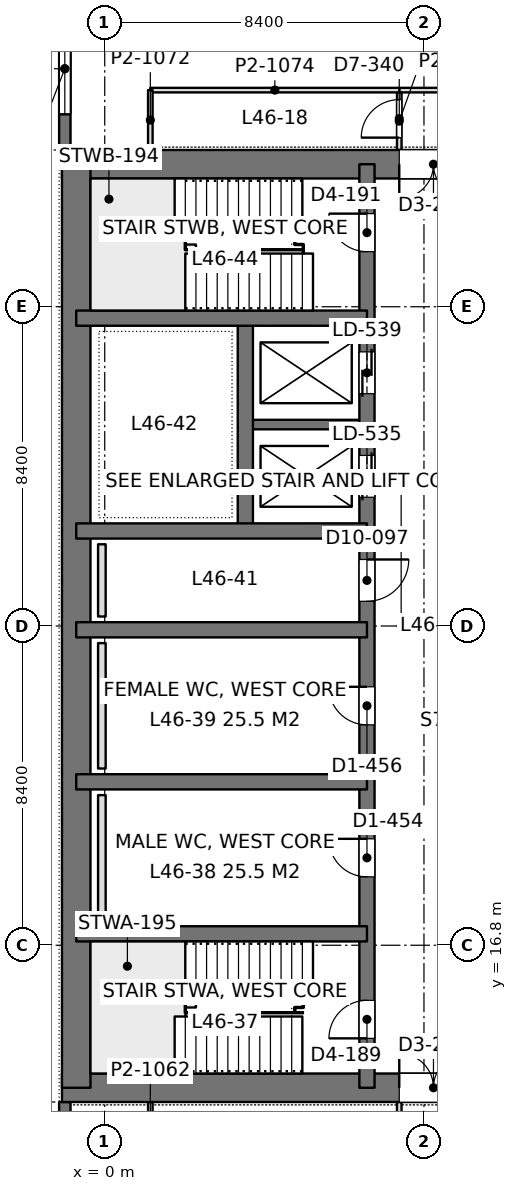
"""IFC4 building model, lengths in metres.
Left out: names, types, materials, properties, quantities, classifications, styles, units other than length and angle.
Written with IfcOpenShell. Run it as: python <this file> out.ifc"""

import sys

from ifc_helpers import new_model, si_unit, direction, frame, frame_2d, origin, place, context, subcontext, project, spatial, rectangle, extrude, element, fill, save


model = new_model("IFC4")
c1 = context("Model", 3, precision=1e-05, world=origin(), true_north=direction((0.0, 1.0)))
c2 = subcontext(c1, "Body", "Model", "MODEL_VIEW")
j1 = project(units=[si_unit("LENGTHUNIT", "METRE"), si_unit("PLANEANGLEUNIT", "RADIAN")], contexts=[c1])
p1 = place(None, origin())
s1 = spatial("IfcSite", under=j1, at=p1, CompositionType="ELEMENT")
p2 = place(p1, origin())
s2 = spatial("IfcBuilding", under=s1, at=p2, CompositionType="ELEMENT")
p3 = place(p2, frame((0.0, 0.0, 202.8)))
s3 = spatial("IfcBuildingStorey", under=s2, at=p3, CompositionType="ELEMENT", Elevation=202.8)
p4 = place(p3, frame((-1.125, 13.05, 0.0), z_axis=(0.0, 0.0, 1.0), x_axis=(1.0, 0.0, 0.0)))
e1 = element("IfcWall", 1, at=p4, inside=s3, PredefinedType="SHEAR", context=c2, shape_type="SweptSolid", body=[
    extrude(rectangle(XDim=17.85, YDim=0.75, at=frame_2d((8.925, 0.0))), origin(), (0.0, 0.0, 1.0), 4.2),
])
p5 = place(p4, frame((8.875, 0.0, 0.0)))
e2 = element("IfcOpeningElement", 2, at=p5, cuts=e1, PredefinedType="OPENING", context=c2, shape_type="SweptSolid", body=[
    extrude(rectangle(XDim=1.8, YDim=2.4, at=frame_2d((0.9, 1.2))), frame((0.0, 0.385, 0.0), z_axis=(0.0, -1.0, 0.0), x_axis=(1.0, 0.0, 0.0)), (0.0, 0.0, 1.0), 0.77),
])
p6 = place(p3, frame((-1.125, 37.35, 0.0), z_axis=(0.0, 0.0, 1.0), x_axis=(1.0, 0.0, 0.0)))
e3 = element("IfcWall", 3, at=p6, inside=s3, PredefinedType="SHEAR", context=c2, shape_type="SweptSolid", body=[
    extrude(rectangle(XDim=17.85, YDim=0.75, at=frame_2d((8.925, 0.0))), origin(), (0.0, 0.0, 1.0), 4.2),
])
p7 = place(p6, frame((8.875, 0.0, 0.0)))
e4 = element("IfcOpeningElement", 4, at=p7, cuts=e3, PredefinedType="OPENING", context=c2, shape_type="SweptSolid", body=[
    extrude(rectangle(XDim=1.8, YDim=2.4, at=frame_2d((0.9, 1.2))), frame((0.0, 0.385, 0.0), z_axis=(0.0, -1.0, 0.0), x_axis=(1.0, 0.0, 0.0)), (0.0, 0.0, 1.0), 0.77),
])
p8 = place(p3, frame((-0.75, 13.05, 0.0), z_axis=(0.0, 0.0, 1.0), x_axis=(0.0, 1.0, 0.0)))
e5 = element("IfcWall", 5, at=p8, inside=s3, PredefinedType="SHEAR", context=c2, shape_type="SweptSolid", body=[
    extrude(rectangle(XDim=24.3, YDim=0.75, at=frame_2d((12.15, 0.0))), origin(), (0.0, 0.0, 1.0), 4.2),
])
p9 = place(p3, frame((6.9, 13.05, 0.0), z_axis=(0.0, 0.0, 1.0), x_axis=(0.0, 1.0, 0.0)))
e6 = element("IfcWall", 6, at=p9, inside=s3, PredefinedType="SHEAR", context=c2, shape_type="SweptSolid", body=[
    extrude(rectangle(XDim=24.3, YDim=0.4, at=frame_2d((12.15, 0.0))), origin(), (0.0, 0.0, 1.0), 4.2),
])
p10 = place(p9, frame((1.3, 0.0, 0.0)))
e7 = element("IfcOpeningElement", 7, at=p10, cuts=e6, PredefinedType="OPENING", context=c2, shape_type="SweptSolid", body=[
    extrude(rectangle(XDim=1.0, YDim=2.2, at=frame_2d((0.5, 1.1))), frame((0.0, 0.21, 0.0), z_axis=(0.0, -1.0, 0.0), x_axis=(1.0, 0.0, 0.0)), (0.0, 0.0, 1.0), 0.42),
])
p11 = place(p9, frame((22.0, 0.0, 0.0)))
e8 = element("IfcOpeningElement", 8, at=p11, cuts=e6, PredefinedType="OPENING", context=c2, shape_type="SweptSolid", body=[
    extrude(rectangle(XDim=1.0, YDim=2.2, at=frame_2d((0.5, 1.1))), frame((0.0, 0.21, 0.0), z_axis=(0.0, -1.0, 0.0), x_axis=(1.0, 0.0, 0.0)), (0.0, 0.0, 1.0), 0.42),
])
p12 = place(p9, frame((5.55, 0.0, 0.0)))
e9 = element("IfcOpeningElement", 9, at=p12, cuts=e6, PredefinedType="OPENING", context=c2, shape_type="SweptSolid", body=[
    extrude(rectangle(XDim=1.0, YDim=2.2, at=frame_2d((0.5, 1.1))), frame((0.0, 0.21, 0.0), z_axis=(0.0, -1.0, 0.0), x_axis=(1.0, 0.0, 0.0)), (0.0, 0.0, 1.0), 0.42),
])
p13 = place(p9, frame((9.55, 0.0, 0.0)))
e10 = element("IfcOpeningElement", 10, at=p13, cuts=e6, PredefinedType="OPENING", context=c2, shape_type="SweptSolid", body=[
    extrude(rectangle(XDim=1.0, YDim=2.2, at=frame_2d((0.5, 1.1))), frame((0.0, 0.21, 0.0), z_axis=(0.0, -1.0, 0.0), x_axis=(1.0, 0.0, 0.0)), (0.0, 0.0, 1.0), 0.42),
])
p14 = place(p9, frame((12.8, 0.0, 0.0)))
e11 = element("IfcOpeningElement", 11, at=p14, cuts=e6, PredefinedType="OPENING", context=c2, shape_type="SweptSolid", body=[
    extrude(rectangle(XDim=1.1, YDim=2.2, at=frame_2d((0.55, 1.1))), frame((0.0, 0.21, 0.0), z_axis=(0.0, -1.0, 0.0), x_axis=(1.0, 0.0, 0.0)), (0.0, 0.0, 1.0), 0.42),
])
p15 = place(p9, frame((15.538, 0.0, 0.0)))
e12 = element("IfcOpeningElement", 12, at=p15, cuts=e6, PredefinedType="OPENING", context=c2, shape_type="SweptSolid", body=[
    extrude(rectangle(XDim=1.1, YDim=2.2, at=frame_2d((0.55, 1.1))), frame((0.0, 0.21, 0.0), z_axis=(0.0, -1.0, 0.0), x_axis=(1.0, 0.0, 0.0)), (0.0, 0.0, 1.0), 0.42),
])
p16 = place(p9, frame((18.262, 0.0, 0.0)))
e13 = element("IfcOpeningElement", 13, at=p16, cuts=e6, PredefinedType="OPENING", context=c2, shape_type="SweptSolid", body=[
    extrude(rectangle(XDim=1.1, YDim=2.2, at=frame_2d((0.55, 1.1))), frame((0.0, 0.21, 0.0), z_axis=(0.0, -1.0, 0.0), x_axis=(1.0, 0.0, 0.0)), (0.0, 0.0, 1.0), 0.42),
])
for number, where, z_axis, x_axis in (
    (14, (-0.75, 17.1, 0.0), (0.0, 0.0, 1.0), (1.0, 0.0, 0.0)),
    (15, (-0.75, 21.1, 0.0), (0.0, 0.0, 1.0), (1.0, 0.0, 0.0)),
    (16, (-0.75, 25.1, 0.0), (0.0, 0.0, 1.0), (1.0, 0.0, 0.0)),
    (17, (-0.75, 27.7, 0.0), (0.0, 0.0, 1.0), (1.0, 0.0, 0.0)),
    (18, (-0.75, 33.3, 0.0), (0.0, 0.0, 1.0), (1.0, 0.0, 0.0)),
):
    element("IfcWall", number, at=place(p3, frame(where, z_axis=z_axis, x_axis=x_axis)), inside=s3, PredefinedType="SHEAR", context=c2, shape_type="SweptSolid", body=[
        extrude(rectangle(XDim=7.65, YDim=0.4, at=frame_2d((3.825, 0.0))), origin(), (0.0, 0.0, 1.0), 4.2),
    ])
p17 = place(p3, frame((3.7, 27.7, 0.0), z_axis=(0.0, 0.0, 1.0), x_axis=(0.0, 1.0, 0.0)))
e19 = element("IfcWall", 19, at=p17, inside=s3, PredefinedType="SHEAR", context=c2, shape_type="SweptSolid", body=[
    extrude(rectangle(XDim=5.6, YDim=0.4, at=frame_2d((2.8, 0.0))), origin(), (0.0, 0.0, 1.0), 4.2),
])
p18 = place(p3, frame((3.7, 30.5, 0.0), z_axis=(0.0, 0.0, 1.0), x_axis=(1.0, 0.0, 0.0)))
e20 = element("IfcWall", 20, at=p18, inside=s3, PredefinedType="SHEAR", context=c2, shape_type="SweptSolid", body=[
    extrude(rectangle(XDim=3.2, YDim=0.25, at=frame_2d((1.6, 0.0))), origin(), (0.0, 0.0, 1.0), 4.2),
])
p19 = place(p3, frame((-1.05, 8.4, 0.0), z_axis=(0.0, 0.0, 1.0), x_axis=(0.0, 1.0, 0.0)))
e21 = element("IfcWall", 21, at=p19, inside=s3, PredefinedType="SOLIDWALL", context=c2, shape_type="SweptSolid", body=[
    extrude(rectangle(XDim=4.275, YDim=0.3, at=frame_2d((2.138, 0.0))), origin(), (0.0, 0.0, 1.0), 4.05),
])
p20 = place(p19, frame((0.938, 0.0, 0.9)))
e22 = element("IfcOpeningElement", 22, at=p20, cuts=e21, PredefinedType="OPENING", context=c2, shape_type="SweptSolid", body=[
    extrude(rectangle(XDim=2.4, YDim=1.9, at=frame_2d((1.2, 0.95))), frame((0.0, 0.16, 0.0), z_axis=(0.0, -1.0, 0.0), x_axis=(1.0, 0.0, 0.0)), (0.0, 0.0, 1.0), 0.32),
])
p21 = place(p3, frame((-1.05, 37.725, 0.0), z_axis=(0.0, 0.0, 1.0), x_axis=(0.0, 1.0, 0.0)))
e23 = element("IfcWall", 23, at=p21, inside=s3, PredefinedType="SOLIDWALL", context=c2, shape_type="SweptSolid", body=[
    extrude(rectangle(XDim=4.275, YDim=0.3, at=frame_2d((2.137, 0.0))), origin(), (0.0, 0.0, 1.0), 4.05),
])
p22 = place(p21, frame((0.938, 0.0, 0.9)))
e24 = element("IfcOpeningElement", 24, at=p22, cuts=e23, PredefinedType="OPENING", context=c2, shape_type="SweptSolid", body=[
    extrude(rectangle(XDim=2.4, YDim=1.9, at=frame_2d((1.2, 0.95))), frame((0.0, 0.16, 0.0), z_axis=(0.0, -1.0, 0.0), x_axis=(1.0, 0.0, 0.0)), (0.0, 0.0, 1.0), 0.32),
])
p23 = place(p3, frame((7.75, 11.158, 0.0), z_axis=(0.0, 0.0, 1.0), x_axis=(0.0, 1.0, 0.0)))
e25 = element("IfcWall", 25, at=p23, inside=s3, PredefinedType="PARTITIONING", context=c2, shape_type="SweptSolid", body=[
    extrude(rectangle(XDim=1.518, YDim=0.12, at=frame_2d((0.759, 0.0))), origin(), (0.0, 0.0, 1.0), 4.05),
])
p24 = place(p23, frame((0.192, 0.0, 0.0)))
e26 = element("IfcOpeningElement", 26, at=p24, cuts=e25, PredefinedType="OPENING", context=c2, shape_type="SweptSolid", body=[
    extrude(rectangle(XDim=1.0, YDim=2.4, at=frame_2d((0.5, 1.2))), frame((0.0, 0.07, 0.0), z_axis=(0.0, -1.0, 0.0), x_axis=(1.0, 0.0, 0.0)), (0.0, 0.0, 1.0), 0.14),
])
p25 = place(p3, frame((1.2, 11.1, 0.0), z_axis=(0.0, 0.0, 1.0), x_axis=(0.0, 1.0, 0.0)))
e27 = element("IfcWall", 27, at=p25, inside=s3, PredefinedType="PARTITIONING", context=c2, shape_type="SweptSolid", body=[
    extrude(rectangle(XDim=1.576, YDim=0.12, at=frame_2d((0.788, 0.0))), origin(), (0.0, 0.0, 1.0), 4.05),
])
p26 = place(p3, frame((7.748, 39.3, 0.0), z_axis=(0.0, 0.0, 1.0), x_axis=(1.0, 0.0, 0.0)))
e28 = element("IfcWall", 28, at=p26, inside=s3, PredefinedType="PARTITIONING", context=c2, shape_type="SweptSolid", body=[
    extrude(rectangle(XDim=34.904, YDim=0.12, at=frame_2d((17.452, 0.0))), origin(), (0.0, 0.0, 1.0), 3.55),
])
p27 = place(p26, frame((2.119, 0.0, 0.0)))
e29 = element("IfcOpeningElement", 29, at=p27, cuts=e28, PredefinedType="OPENING", context=c2, shape_type="SweptSolid", body=[
    extrude(rectangle(XDim=1.8, YDim=2.2, at=frame_2d((0.9, 1.1))), frame((0.0, 0.07, 0.0), z_axis=(0.0, -1.0, 0.0), x_axis=(1.0, 0.0, 0.0)), (0.0, 0.0, 1.0), 0.14),
])
p28 = place(p26, frame((5.135, 0.0, 0.0)))
e30 = element("IfcOpeningElement", 30, at=p28, cuts=e28, PredefinedType="OPENING", context=c2, shape_type="SweptSolid", body=[
    extrude(rectangle(XDim=1.8, YDim=2.2, at=frame_2d((0.9, 1.1))), frame((0.0, 0.07, 0.0), z_axis=(0.0, -1.0, 0.0), x_axis=(1.0, 0.0, 0.0)), (0.0, 0.0, 1.0), 0.14),
])
p29 = place(p26, frame((13.752, 0.0, 0.0)))
e31 = element("IfcOpeningElement", 31, at=p29, cuts=e28, PredefinedType="OPENING", context=c2, shape_type="SweptSolid", body=[
    extrude(rectangle(XDim=1.8, YDim=2.2, at=frame_2d((0.9, 1.1))), frame((0.0, 0.07, 0.0), z_axis=(0.0, -1.0, 0.0), x_axis=(1.0, 0.0, 0.0)), (0.0, 0.0, 1.0), 0.14),
])
p30 = place(p26, frame((19.352, 0.0, 0.0)))
e32 = element("IfcOpeningElement", 32, at=p30, cuts=e28, PredefinedType="OPENING", context=c2, shape_type="SweptSolid", body=[
    extrude(rectangle(XDim=1.8, YDim=2.2, at=frame_2d((0.9, 1.1))), frame((0.0, 0.07, 0.0), z_axis=(0.0, -1.0, 0.0), x_axis=(1.0, 0.0, 0.0)), (0.0, 0.0, 1.0), 0.14),
])
p31 = place(p26, frame((27.969, 0.0, 0.0)))
e33 = element("IfcOpeningElement", 33, at=p31, cuts=e28, PredefinedType="OPENING", context=c2, shape_type="SweptSolid", body=[
    extrude(rectangle(XDim=1.8, YDim=2.2, at=frame_2d((0.9, 1.1))), frame((0.0, 0.07, 0.0), z_axis=(0.0, -1.0, 0.0), x_axis=(1.0, 0.0, 0.0)), (0.0, 0.0, 1.0), 0.14),
])
p32 = place(p26, frame((30.985, 0.0, 0.0)))
e34 = element("IfcOpeningElement", 34, at=p32, cuts=e28, PredefinedType="OPENING", context=c2, shape_type="SweptSolid", body=[
    extrude(rectangle(XDim=1.8, YDim=2.2, at=frame_2d((0.9, 1.1))), frame((0.0, 0.07, 0.0), z_axis=(0.0, -1.0, 0.0), x_axis=(1.0, 0.0, 0.0)), (0.0, 0.0, 1.0), 0.14),
])
p33 = place(p3, frame((7.75, 37.724, 0.0), z_axis=(0.0, 0.0, 1.0), x_axis=(0.0, 1.0, 0.0)))
e35 = element("IfcWall", 35, at=p33, inside=s3, PredefinedType="PARTITIONING", context=c2, shape_type="SweptSolid", body=[
    extrude(rectangle(XDim=1.518, YDim=0.12, at=frame_2d((0.759, 0.0))), origin(), (0.0, 0.0, 1.0), 4.05),
])
p34 = place(p33, frame((0.326, 0.0, 0.0)))
e36 = element("IfcOpeningElement", 36, at=p34, cuts=e35, PredefinedType="OPENING", context=c2, shape_type="SweptSolid", body=[
    extrude(rectangle(XDim=1.0, YDim=2.4, at=frame_2d((0.5, 1.2))), frame((0.0, 0.07, 0.0), z_axis=(0.0, -1.0, 0.0), x_axis=(1.0, 0.0, 0.0)), (0.0, 0.0, 1.0), 0.14),
])
p35 = place(p3, frame((1.2, 39.3, 0.0), z_axis=(0.0, 0.0, 1.0), x_axis=(1.0, 0.0, 0.0)))
e37 = element("IfcWall", 37, at=p35, inside=s3, PredefinedType="PARTITIONING", context=c2, shape_type="SweptSolid", body=[
    extrude(rectangle(XDim=6.552, YDim=0.12, at=frame_2d((3.276, 0.0))), origin(), (0.0, 0.0, 1.0), 3.69),
])
p36 = place(p3, frame((1.2, 37.724, 0.0), z_axis=(0.0, 0.0, 1.0), x_axis=(0.0, 1.0, 0.0)))
e38 = element("IfcWall", 38, at=p36, inside=s3, PredefinedType="PARTITIONING", context=c2, shape_type="SweptSolid", body=[
    extrude(rectangle(XDim=1.576, YDim=0.12, at=frame_2d((0.788, 0.0))), origin(), (0.0, 0.0, 1.0), 4.05),
])
for number, where, z_axis, x_axis in (
    (39, (-0.075, 17.45, 0.0), (0.0, 0.0, 1.0), (0.0, 1.0, 0.0)),
    (40, (-0.075, 21.45, 0.0), (0.0, 0.0, 1.0), (0.0, 1.0, 0.0)),
):
    element("IfcWall", number, at=place(p3, frame(where, z_axis=z_axis, x_axis=x_axis)), inside=s3, PredefinedType="PLUMBINGWALL", context=c2, shape_type="SweptSolid", body=[
        extrude(rectangle(XDim=3.3, YDim=0.2, at=frame_2d((1.65, 0.0))), origin(), (0.0, 0.0, 1.0), 1.2),
    ])
p37 = place(p3, frame((-0.075, 25.45, 0.0), z_axis=(0.0, 0.0, 1.0), x_axis=(0.0, 1.0, 0.0)))
e41 = element("IfcWall", 41, at=p37, inside=s3, PredefinedType="PLUMBINGWALL", context=c2, shape_type="SweptSolid", body=[
    extrude(rectangle(XDim=1.9, YDim=0.2, at=frame_2d((0.95, 0.0))), origin(), (0.0, 0.0, 1.0), 1.2),
])
p38 = place(p22, origin())
e42 = element("IfcWindow", 42, at=p38, inside=s3, PartitioningType="SINGLE_PANEL", PredefinedType="WINDOW", context=c2, shape_type="SweptSolid", body=[
    extrude(rectangle(XDim=2.4, YDim=1.9, at=frame_2d((1.2, 0.95))), frame((0.0, 0.03, 0.0), z_axis=(0.0, -1.0, 0.0), x_axis=(1.0, 0.0, 0.0)), (0.0, 0.0, 1.0), 0.06),
])
fill(e24, e42)
p39 = place(p5, origin())
e43 = element("IfcDoor", 43, at=p39, inside=s3, OperationType="DOUBLE_DOOR_SINGLE_SWING", PredefinedType="DOOR", context=c2, shape_type="SweptSolid", body=[
    extrude(rectangle(XDim=1.8, YDim=2.4, at=frame_2d((0.9, 1.2))), frame((0.0, 0.025, 0.0), z_axis=(0.0, -1.0, 0.0), x_axis=(1.0, 0.0, 0.0)), (0.0, 0.0, 1.0), 0.05),
])
fill(e2, e43)
p40 = place(p7, frame((1.8, 0.0, 0.0), z_axis=(0.0, 0.0, 1.0), x_axis=(-1.0, 0.0, 0.0)))
e44 = element("IfcDoor", 44, at=p40, inside=s3, OperationType="DOUBLE_DOOR_SINGLE_SWING", PredefinedType="DOOR", context=c2, shape_type="SweptSolid", body=[
    extrude(rectangle(XDim=1.8, YDim=2.4, at=frame_2d((0.9, 1.2))), frame((0.0, 0.025, 0.0), z_axis=(0.0, -1.0, 0.0), x_axis=(1.0, 0.0, 0.0)), (0.0, 0.0, 1.0), 0.05),
])
fill(e4, e44)
p41 = place(p10, origin())
e45 = element("IfcDoor", 45, at=p41, inside=s3, OperationType="SINGLE_SWING_LEFT", PredefinedType="DOOR", context=c2, shape_type="SweptSolid", body=[
    extrude(rectangle(XDim=1.0, YDim=2.2, at=frame_2d((0.5, 1.1))), frame((0.0, 0.025, 0.0), z_axis=(0.0, -1.0, 0.0), x_axis=(1.0, 0.0, 0.0)), (0.0, 0.0, 1.0), 0.05),
])
fill(e7, e45)
p42 = place(p11, origin())
e46 = element("IfcDoor", 46, at=p42, inside=s3, OperationType="SINGLE_SWING_RIGHT", PredefinedType="DOOR", context=c2, shape_type="SweptSolid", body=[
    extrude(rectangle(XDim=1.0, YDim=2.2, at=frame_2d((0.5, 1.1))), frame((0.0, 0.025, 0.0), z_axis=(0.0, -1.0, 0.0), x_axis=(1.0, 0.0, 0.0)), (0.0, 0.0, 1.0), 0.05),
])
fill(e8, e46)
p43 = place(p12, origin())
e47 = element("IfcDoor", 47, at=p43, inside=s3, OperationType="SINGLE_SWING_RIGHT", PredefinedType="DOOR", context=c2, shape_type="SweptSolid", body=[
    extrude(rectangle(XDim=1.0, YDim=2.2, at=frame_2d((0.5, 1.1))), frame((0.0, 0.025, 0.0), z_axis=(0.0, -1.0, 0.0), x_axis=(1.0, 0.0, 0.0)), (0.0, 0.0, 1.0), 0.05),
])
fill(e9, e47)
p44 = place(p13, origin())
e48 = element("IfcDoor", 48, at=p44, inside=s3, OperationType="SINGLE_SWING_RIGHT", PredefinedType="DOOR", context=c2, shape_type="SweptSolid", body=[
    extrude(rectangle(XDim=1.0, YDim=2.2, at=frame_2d((0.5, 1.1))), frame((0.0, 0.025, 0.0), z_axis=(0.0, -1.0, 0.0), x_axis=(1.0, 0.0, 0.0)), (0.0, 0.0, 1.0), 0.05),
])
fill(e10, e48)
p45 = place(p14, frame((1.1, 0.0, 0.0), z_axis=(0.0, 0.0, 1.0), x_axis=(-1.0, 0.0, 0.0)))
e49 = element("IfcDoor", 49, at=p45, inside=s3, OperationType="SINGLE_SWING_LEFT", PredefinedType="DOOR", context=c2, shape_type="SweptSolid", body=[
    extrude(rectangle(XDim=1.1, YDim=2.2, at=frame_2d((0.55, 1.1))), frame((0.0, 0.025, 0.0), z_axis=(0.0, -1.0, 0.0), x_axis=(1.0, 0.0, 0.0)), (0.0, 0.0, 1.0), 0.05),
])
fill(e11, e49)
p46 = place(p15, origin())
e50 = element("IfcDoor", 50, at=p46, inside=s3, OperationType="DOUBLE_DOOR_SLIDING", PredefinedType="DOOR", context=c2, shape_type="SweptSolid", body=[
    extrude(rectangle(XDim=1.1, YDim=2.2, at=frame_2d((0.55, 1.1))), frame((0.0, 0.025, 0.0), z_axis=(0.0, -1.0, 0.0), x_axis=(1.0, 0.0, 0.0)), (0.0, 0.0, 1.0), 0.05),
])
fill(e12, e50)
p47 = place(p16, origin())
e51 = element("IfcDoor", 51, at=p47, inside=s3, OperationType="DOUBLE_DOOR_SLIDING", PredefinedType="DOOR", context=c2, shape_type="SweptSolid", body=[
    extrude(rectangle(XDim=1.1, YDim=2.2, at=frame_2d((0.55, 1.1))), frame((0.0, 0.025, 0.0), z_axis=(0.0, -1.0, 0.0), x_axis=(1.0, 0.0, 0.0)), (0.0, 0.0, 1.0), 0.05),
])
fill(e13, e51)
p48 = place(p34, origin())
e52 = element("IfcDoor", 52, at=p48, inside=s3, OperationType="SINGLE_SWING_LEFT", PredefinedType="DOOR", context=c2, shape_type="SweptSolid", body=[
    extrude(rectangle(XDim=1.0, YDim=2.4, at=frame_2d((0.5, 1.2))), frame((0.0, 0.025, 0.0), z_axis=(0.0, -1.0, 0.0), x_axis=(1.0, 0.0, 0.0)), (0.0, 0.0, 1.0), 0.05),
])
fill(e36, e52)
save(model, sys.argv[1])
